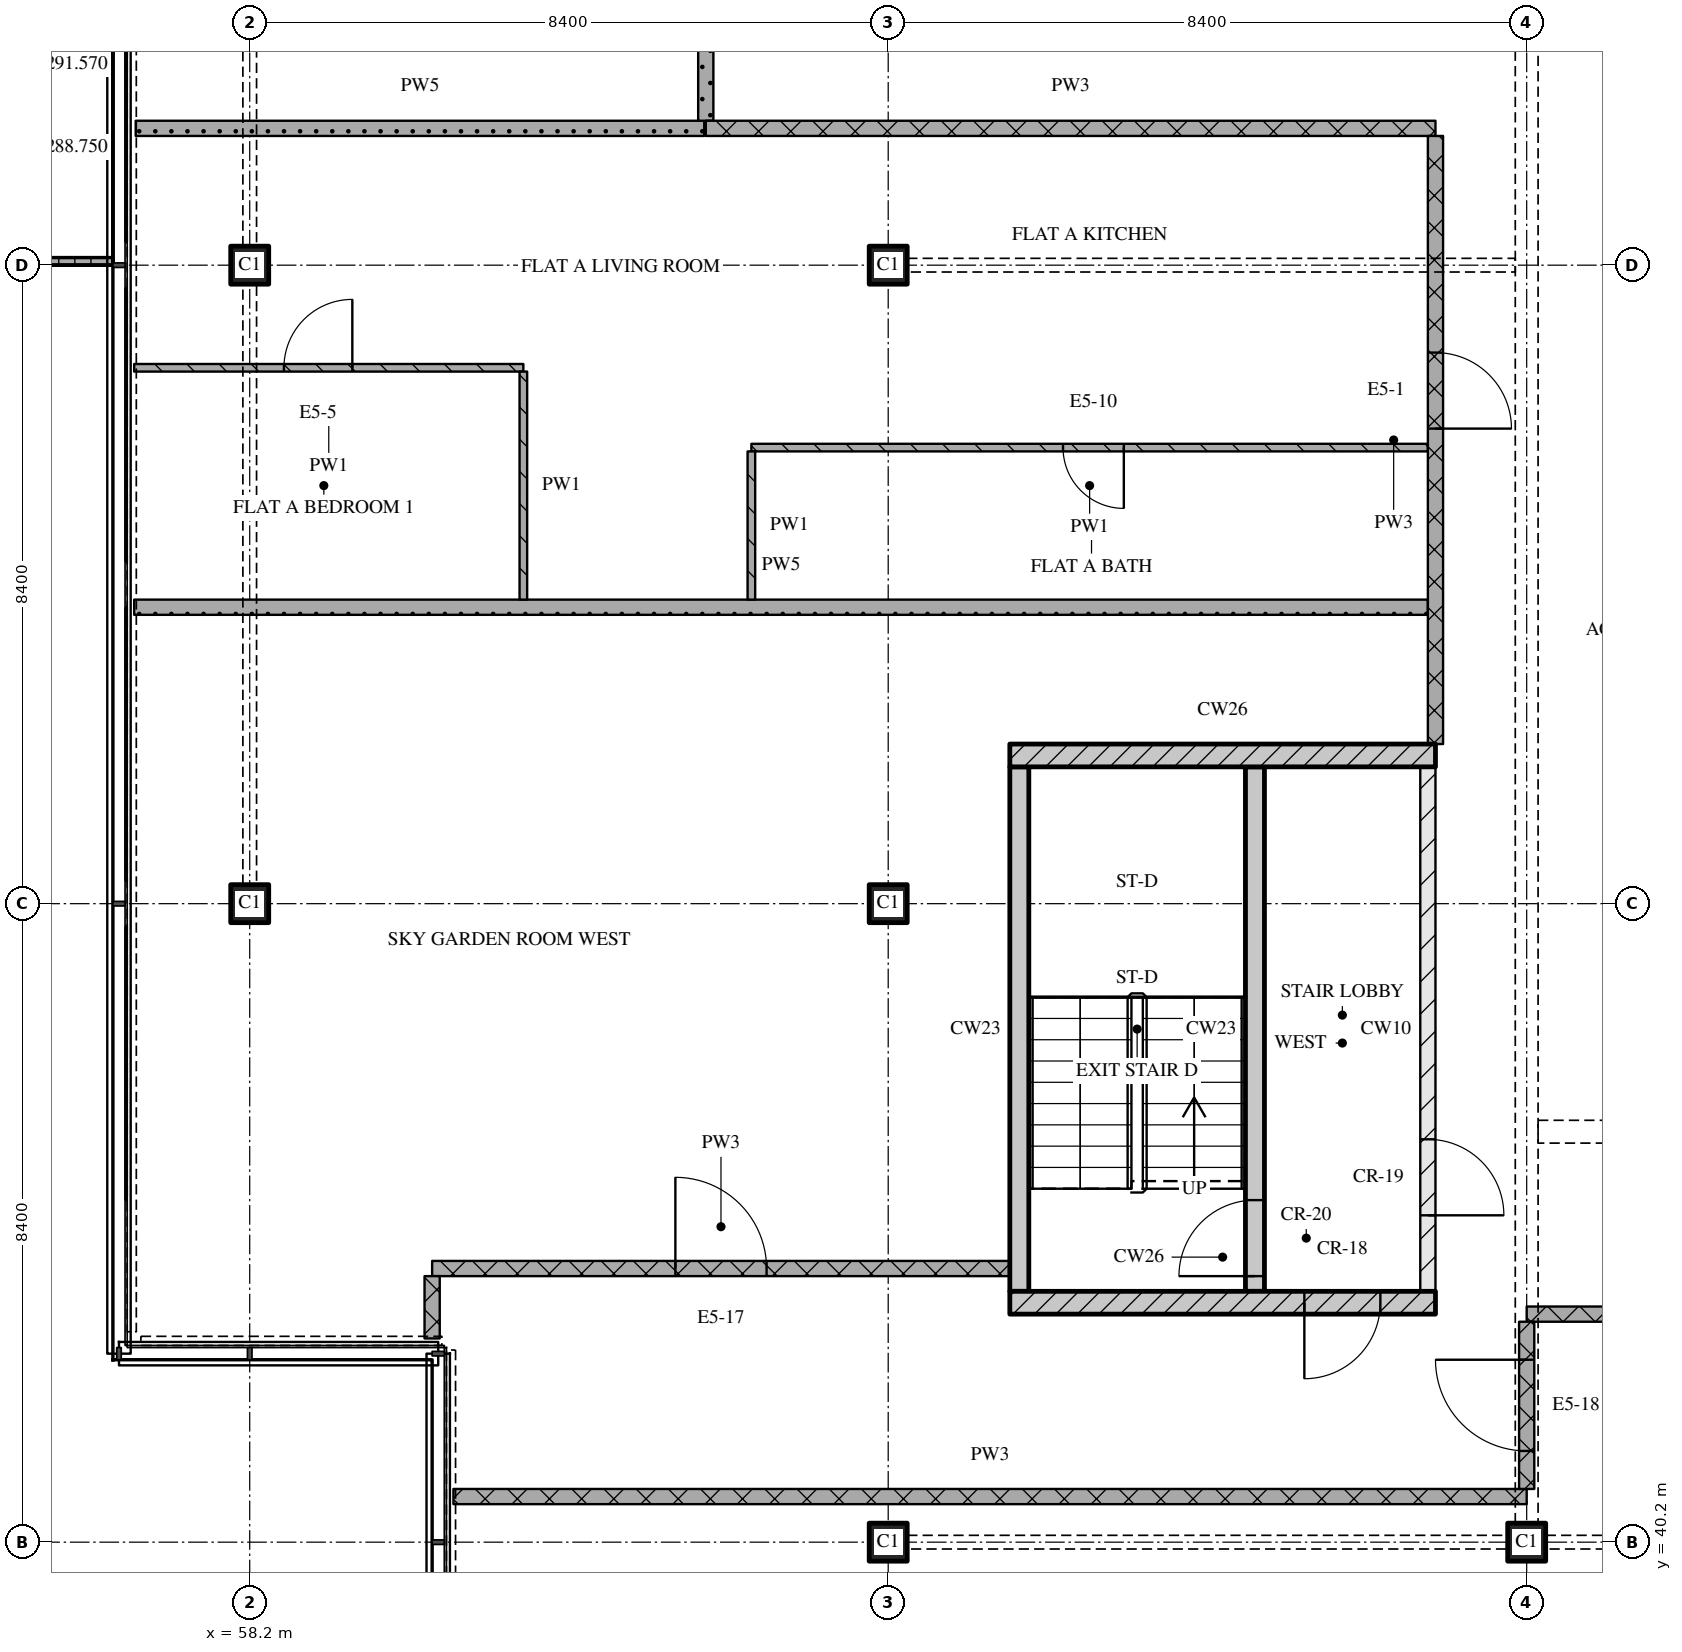
"""IFC4 building model, lengths in metres.
Left out: names, types, materials, properties, quantities, classifications, styles, units other than length and angle.
Written with IfcOpenShell. Run it as: python <this file> out.ifc"""

import sys

from ifc_helpers import new_model, si_unit, direction, frame, frame_2d, origin, origin_2d, place, context, subcontext, project, spatial, polyline, rectangle, outline, extrude, element, fill, save


model = new_model("IFC4")
c1 = context("Model", 3, precision=1e-05, world=origin(), true_north=direction((0.0, 1.0)))
c2 = subcontext(c1, "Body", "Model", "MODEL_VIEW")
j1 = project(units=[si_unit("LENGTHUNIT", "METRE"), si_unit("PLANEANGLEUNIT", "RADIAN")], contexts=[c1])
p1 = place(None, origin())
s1 = spatial("IfcSite", under=j1, at=p1, CompositionType="ELEMENT")
p2 = place(p1, origin())
s2 = spatial("IfcBuilding", under=s1, at=p2, CompositionType="ELEMENT")
p3 = place(p2, frame((0.0, 0.0, 288.75)))
s3 = spatial("IfcBuildingStorey", under=s2, at=p3, CompositionType="ELEMENT", Elevation=288.75)
for number, where, z_axis, x_axis in (
    (1, (58.2, 48.6, 0.0), (0.0, 0.0, 1.0), (1.0, 0.0, 0.0)),
    (2, (58.2, 57.0, 0.0), (0.0, 0.0, 1.0), (1.0, 0.0, 0.0)),
    (3, (66.6, 40.2, 0.0), (0.0, 0.0, 1.0), (1.0, 0.0, 0.0)),
    (4, (66.6, 48.6, 0.0), (0.0, 0.0, 1.0), (1.0, 0.0, 0.0)),
    (5, (66.6, 57.0, 0.0), (0.0, 0.0, 1.0), (1.0, 0.0, 0.0)),
    (6, (75.0, 40.2, 0.0), (0.0, 0.0, 1.0), (1.0, 0.0, 0.0)),
):
    element("IfcColumn", number, at=place(p3, frame(where, z_axis=z_axis, x_axis=x_axis)), inside=s3, PredefinedType="COLUMN", context=c2, shape_type="SweptSolid", body=[
        extrude(rectangle(XDim=0.5, YDim=0.5, at=origin_2d()), origin(), (0.0, 0.0, 1.0), 3.6),
    ])
p4 = place(p3, origin())
e7 = element("IfcWall", 7, at=p4, inside=s3, PredefinedType="SOLIDWALL", context=c2, shape_type="SweptSolid", body=[
    extrude(outline(polyline([(56.4, 61.2), (56.4, 61.1), (54.767, 61.1), (54.767, 57.1), (56.4, 57.1), (56.4, 57.0), (54.667, 57.0), (54.667, 61.2), (56.4, 61.2)])), origin(), (0.0, 0.0, 1.0), 1.0),
])
p5 = place(p3, frame((68.2, 43.35, 0.0), z_axis=(0.0, 0.0, 1.0), x_axis=(1.0, 0.0, 0.0)))
e8 = element("IfcWall", 8, at=p5, inside=s3, PredefinedType="SOLIDWALL", context=c2, shape_type="SweptSolid", body=[
    extrude(rectangle(XDim=5.6, YDim=0.3, at=frame_2d((2.8, 0.0))), origin(), (0.0, 0.0, 1.0), 3.32),
])
p6 = place(p5, frame((3.875, 0.0, 0.0)))
e9 = element("IfcOpeningElement", 9, at=p6, cuts=e8, PredefinedType="OPENING", context=c2, shape_type="SweptSolid", body=[
    extrude(rectangle(XDim=1.0, YDim=2.1, at=frame_2d((0.5, 1.05))), frame((0.0, 0.16, 0.0), z_axis=(0.0, -1.0, 0.0), x_axis=(1.0, 0.0, 0.0)), (0.0, 0.0, 1.0), 0.32),
])
p7 = place(p3, frame((68.325, 43.5, 0.0), z_axis=(0.0, 0.0, 1.0), x_axis=(0.0, 1.0, 0.0)))
e10 = element("IfcWall", 10, at=p7, inside=s3, PredefinedType="SOLIDWALL", context=c2, shape_type="SweptSolid", body=[
    extrude(rectangle(XDim=6.9, YDim=0.25, at=frame_2d((3.45, 0.0))), origin(), (0.0, 0.0, 1.0), 3.32),
])
p8 = place(p3, frame((71.425, 43.5, 0.0), z_axis=(0.0, 0.0, 1.0), x_axis=(0.0, 1.0, 0.0)))
e11 = element("IfcWall", 11, at=p8, inside=s3, PredefinedType="SOLIDWALL", context=c2, shape_type="SweptSolid", body=[
    extrude(rectangle(XDim=6.9, YDim=0.25, at=frame_2d((3.45, 0.0))), origin(), (0.0, 0.0, 1.0), 3.32),
])
p9 = place(p8, frame((0.2, 0.0, 0.0)))
e12 = element("IfcOpeningElement", 12, at=p9, cuts=e11, PredefinedType="OPENING", context=c2, shape_type="SweptSolid", body=[
    extrude(rectangle(XDim=1.0, YDim=2.1, at=frame_2d((0.5, 1.05))), frame((0.0, 0.135, 0.0), z_axis=(0.0, -1.0, 0.0), x_axis=(1.0, 0.0, 0.0)), (0.0, 0.0, 1.0), 0.27),
])
p10 = place(p3, frame((73.7, 43.5, 0.0), z_axis=(0.0, 0.0, 1.0), x_axis=(0.0, 1.0, 0.0)))
e13 = element("IfcWall", 13, at=p10, inside=s3, PredefinedType="PARTITIONING", context=c2, shape_type="SweptSolid", body=[
    extrude(rectangle(XDim=6.9, YDim=0.2, at=frame_2d((3.45, 0.0))), origin(), (0.0, 0.0, 1.0), 3.32),
])
p11 = place(p10, frame((1.0, 0.0, 0.0)))
e14 = element("IfcOpeningElement", 14, at=p11, cuts=e13, PredefinedType="OPENING", context=c2, shape_type="SweptSolid", body=[
    extrude(rectangle(XDim=1.0, YDim=2.1, at=frame_2d((0.5, 1.05))), frame((0.0, 0.11, 0.0), z_axis=(0.0, -1.0, 0.0), x_axis=(1.0, 0.0, 0.0)), (0.0, 0.0, 1.0), 0.22),
])
p12 = place(p3, frame((68.2, 50.55, 0.0), z_axis=(0.0, 0.0, 1.0), x_axis=(1.0, 0.0, 0.0)))
e15 = element("IfcWall", 15, at=p12, inside=s3, PredefinedType="SOLIDWALL", context=c2, shape_type="SweptSolid", body=[
    extrude(rectangle(XDim=5.6, YDim=0.3, at=frame_2d((2.8, 0.0))), origin(), (0.0, 0.0, 1.0), 3.32),
])
p13 = place(p3, frame((60.88, 40.8, 0.0), z_axis=(0.0, 0.0, 1.0), x_axis=(1.0, 0.0, 0.0)))
e16 = element("IfcWall", 16, at=p13, inside=s3, PredefinedType="PARTITIONING", context=c2, shape_type="SweptSolid", body=[
    extrude(rectangle(XDim=14.12, YDim=0.2, at=frame_2d((7.06, 0.0))), origin(), (0.0, 0.0, 1.0), 3.32),
])
p14 = place(p3, frame((100.2, 43.2, 0.0), z_axis=(0.0, 0.0, 1.0), x_axis=(-1.0, 0.0, 0.0)))
e17 = element("IfcWall", 17, at=p14, inside=s3, PredefinedType="PARTITIONING", context=c2, shape_type="SweptSolid", body=[
    extrude(rectangle(XDim=25.2, YDim=0.2, at=frame_2d((12.6, 0.0))), origin(), (0.0, 0.0, 1.0), 3.32),
])
p15 = place(p14, frame((12.0, 0.0, 0.0)))
e18 = element("IfcOpeningElement", 18, at=p15, cuts=e17, PredefinedType="OPENING", context=c2, shape_type="SweptSolid", body=[
    extrude(rectangle(XDim=1.2, YDim=2.1, at=frame_2d((0.6, 1.05))), frame((0.0, 0.11, 0.0), z_axis=(0.0, -1.0, 0.0), x_axis=(1.0, 0.0, 0.0)), (0.0, 0.0, 1.0), 0.22),
])
p16 = place(p3, frame((60.6, 43.8, 0.0), z_axis=(0.0, 0.0, 1.0), x_axis=(1.0, 0.0, 0.0)))
e19 = element("IfcWall", 19, at=p16, inside=s3, PredefinedType="PARTITIONING", context=c2, shape_type="SweptSolid", body=[
    extrude(rectangle(XDim=7.6, YDim=0.2, at=frame_2d((3.8, 0.0))), origin(), (0.0, 0.0, 1.0), 3.32),
])
p17 = place(p16, frame((3.2, 0.0, 0.0)))
e20 = element("IfcOpeningElement", 20, at=p17, cuts=e19, PredefinedType="OPENING", context=c2, shape_type="SweptSolid", body=[
    extrude(rectangle(XDim=1.2, YDim=2.1, at=frame_2d((0.6, 1.05))), frame((0.0, 0.11, 0.0), z_axis=(0.0, -1.0, 0.0), x_axis=(1.0, 0.0, 0.0)), (0.0, 0.0, 1.0), 0.22),
])
p18 = place(p3, frame((56.68, 52.5, 0.0), z_axis=(0.0, 0.0, 1.0), x_axis=(1.0, 0.0, 0.0)))
e21 = element("IfcWall", 21, at=p18, inside=s3, PredefinedType="PARTITIONING", context=c2, shape_type="SweptSolid", body=[
    extrude(rectangle(XDim=17.02, YDim=0.2, at=frame_2d((8.51, 0.0))), origin(), (0.0, 0.0, 1.0), 3.32),
])
p19 = place(p3, frame((73.7, 54.6, 0.0), z_axis=(0.0, 0.0, 1.0), x_axis=(-1.0, 0.0, 0.0)))
e22 = element("IfcWall", 22, at=p19, inside=s3, PredefinedType="PARTITIONING", context=c2, shape_type="SweptSolid", body=[
    extrude(rectangle(XDim=8.9, YDim=0.1, at=frame_2d((4.45, 0.0))), origin(), (0.0, 0.0, 1.0), 3.32),
])
p20 = place(p19, frame((4.0, 0.0, 0.0)))
e23 = element("IfcOpeningElement", 23, at=p20, cuts=e22, PredefinedType="OPENING", context=c2, shape_type="SweptSolid", body=[
    extrude(rectangle(XDim=0.8, YDim=2.1, at=frame_2d((0.4, 1.05))), frame((0.0, 0.06, 0.0), z_axis=(0.0, -1.0, 0.0), x_axis=(1.0, 0.0, 0.0)), (0.0, 0.0, 1.0), 0.12),
])
p21 = place(p3, frame((61.8, 55.65, 0.0), z_axis=(0.0, 0.0, 1.0), x_axis=(-1.0, 0.0, 0.0)))
e24 = element("IfcWall", 24, at=p21, inside=s3, PredefinedType="PARTITIONING", context=c2, shape_type="SweptSolid", body=[
    extrude(rectangle(XDim=5.12, YDim=0.1, at=frame_2d((2.56, 0.0))), origin(), (0.0, 0.0, 1.0), 3.32),
])
p22 = place(p21, frame((2.25, 0.0, 0.0)))
e25 = element("IfcOpeningElement", 25, at=p22, cuts=e24, PredefinedType="OPENING", context=c2, shape_type="SweptSolid", body=[
    extrude(rectangle(XDim=0.9, YDim=2.1, at=frame_2d((0.45, 1.05))), frame((0.0, 0.06, 0.0), z_axis=(0.0, -1.0, 0.0), x_axis=(1.0, 0.0, 0.0)), (0.0, 0.0, 1.0), 0.12),
])
p23 = place(p3, frame((64.2, 58.8, 0.0), z_axis=(0.0, 0.0, 1.0), x_axis=(1.0, 0.0, 0.0)))
e26 = element("IfcWall", 26, at=p23, inside=s3, PredefinedType="PARTITIONING", context=c2, shape_type="SweptSolid", body=[
    extrude(rectangle(XDim=9.6, YDim=0.2, at=frame_2d((4.8, 0.0))), origin(), (0.0, 0.0, 1.0), 3.32),
])
p24 = place(p3, frame((56.7, 58.8, 0.0), z_axis=(0.0, 0.0, 1.0), x_axis=(1.0, 0.0, 0.0)))
e27 = element("IfcWall", 27, at=p24, inside=s3, PredefinedType="PARTITIONING", context=c2, shape_type="SweptSolid", body=[
    extrude(rectangle(XDim=7.48, YDim=0.2, at=frame_2d((3.74, 0.0))), origin(), (0.0, 0.0, 1.0), 3.32),
])
p25 = place(p3, frame((60.6, 43.7, 0.0), z_axis=(0.0, 0.0, 1.0), x_axis=(0.0, -1.0, 0.0)))
e28 = element("IfcWall", 28, at=p25, inside=s3, PredefinedType="PARTITIONING", context=c2, shape_type="SweptSolid", body=[
    extrude(rectangle(XDim=0.82, YDim=0.2, at=frame_2d((0.41, 0.0))), origin(), (0.0, 0.0, 1.0), 3.32),
])
p26 = place(p3, frame((61.8, 55.6, 0.0), z_axis=(0.0, 0.0, 1.0), x_axis=(0.0, -1.0, 0.0)))
e29 = element("IfcWall", 29, at=p26, inside=s3, PredefinedType="PARTITIONING", context=c2, shape_type="SweptSolid", body=[
    extrude(rectangle(XDim=3.0, YDim=0.1, at=frame_2d((1.5, 0.0))), origin(), (0.0, 0.0, 1.0), 3.32),
])
p27 = place(p3, frame((64.2, 61.1, 0.0), z_axis=(0.0, 0.0, 1.0), x_axis=(0.0, -1.0, 0.0)))
e30 = element("IfcWall", 30, at=p27, inside=s3, PredefinedType="PARTITIONING", context=c2, shape_type="SweptSolid", body=[
    extrude(rectangle(XDim=2.2, YDim=0.2, at=frame_2d((1.1, 0.0))), origin(), (0.0, 0.0, 1.0), 3.32),
])
p28 = place(p3, frame((64.8, 54.55, 0.0), z_axis=(0.0, 0.0, 1.0), x_axis=(0.0, -1.0, 0.0)))
e31 = element("IfcWall", 31, at=p28, inside=s3, PredefinedType="PARTITIONING", context=c2, shape_type="SweptSolid", body=[
    extrude(rectangle(XDim=1.95, YDim=0.1, at=frame_2d((0.975, 0.0))), origin(), (0.0, 0.0, 1.0), 3.32),
])
p29 = place(p3, frame((73.8, 50.7, 0.0), z_axis=(0.0, 0.0, 1.0), x_axis=(0.0, 1.0, 0.0)))
e32 = element("IfcWall", 32, at=p29, inside=s3, PredefinedType="PARTITIONING", context=c2, shape_type="SweptSolid", body=[
    extrude(rectangle(XDim=8.0, YDim=0.2, at=frame_2d((4.0, 0.0))), origin(), (0.0, 0.0, 1.0), 3.32),
])
p30 = place(p29, frame((4.15, 0.0, 0.0)))
e33 = element("IfcOpeningElement", 33, at=p30, cuts=e32, PredefinedType="OPENING", context=c2, shape_type="SweptSolid", body=[
    extrude(rectangle(XDim=1.0, YDim=2.1, at=frame_2d((0.5, 1.05))), frame((0.0, 0.11, 0.0), z_axis=(0.0, -1.0, 0.0), x_axis=(1.0, 0.0, 0.0)), (0.0, 0.0, 1.0), 0.22),
])
p31 = place(p3, frame((75.0, 43.1, 0.0), z_axis=(0.0, 0.0, 1.0), x_axis=(0.0, -1.0, 0.0)))
e34 = element("IfcWall", 34, at=p31, inside=s3, PredefinedType="PARTITIONING", context=c2, shape_type="SweptSolid", body=[
    extrude(rectangle(XDim=2.2, YDim=0.2, at=frame_2d((1.1, 0.0))), origin(), (0.0, 0.0, 1.0), 2.53),
])
p32 = place(p31, frame((0.5, 0.0, 0.0)))
e35 = element("IfcOpeningElement", 35, at=p32, cuts=e34, PredefinedType="OPENING", context=c2, shape_type="SweptSolid", body=[
    extrude(rectangle(XDim=1.2, YDim=2.1, at=frame_2d((0.6, 1.05))), frame((0.0, 0.11, 0.0), z_axis=(0.0, -1.0, 0.0), x_axis=(1.0, 0.0, 0.0)), (0.0, 0.0, 1.0), 0.22),
])
p33 = place(p6, origin())
e36 = element("IfcDoor", 36, at=p33, inside=s3, OperationType="SINGLE_SWING_RIGHT", PredefinedType="DOOR", context=c2, shape_type="SweptSolid", body=[
    extrude(rectangle(XDim=1.0, YDim=2.1, at=frame_2d((0.5, 1.05))), frame((0.0, 0.025, 0.0), z_axis=(0.0, -1.0, 0.0), x_axis=(1.0, 0.0, 0.0)), (0.0, 0.0, 1.0), 0.05),
])
fill(e9, e36)
p34 = place(p9, origin())
e37 = element("IfcDoor", 37, at=p34, inside=s3, OperationType="SINGLE_SWING_LEFT", PredefinedType="DOOR", context=c2, shape_type="SweptSolid", body=[
    extrude(rectangle(XDim=1.0, YDim=2.1, at=frame_2d((0.5, 1.05))), frame((0.0, 0.025, 0.0), z_axis=(0.0, -1.0, 0.0), x_axis=(1.0, 0.0, 0.0)), (0.0, 0.0, 1.0), 0.05),
])
fill(e12, e37)
p35 = place(p11, origin())
e38 = element("IfcDoor", 38, at=p35, inside=s3, OperationType="SINGLE_SWING_RIGHT", PredefinedType="DOOR", context=c2, shape_type="SweptSolid", body=[
    extrude(rectangle(XDim=1.0, YDim=2.1, at=frame_2d((0.5, 1.05))), frame((0.0, 0.025, 0.0), z_axis=(0.0, -1.0, 0.0), x_axis=(1.0, 0.0, 0.0)), (0.0, 0.0, 1.0), 0.05),
])
fill(e14, e38)
p36 = place(p17, origin())
e39 = element("IfcDoor", 39, at=p36, inside=s3, OperationType="SINGLE_SWING_LEFT", PredefinedType="DOOR", context=c2, shape_type="SweptSolid", body=[
    extrude(rectangle(XDim=1.2, YDim=2.1, at=frame_2d((0.6, 1.05))), frame((0.0, 0.025, 0.0), z_axis=(0.0, -1.0, 0.0), x_axis=(1.0, 0.0, 0.0)), (0.0, 0.0, 1.0), 0.05),
])
fill(e20, e39)
p37 = place(p20, origin())
e40 = element("IfcDoor", 40, at=p37, inside=s3, OperationType="SINGLE_SWING_LEFT", PredefinedType="DOOR", context=c2, shape_type="SweptSolid", body=[
    extrude(rectangle(XDim=0.8, YDim=2.1, at=frame_2d((0.4, 1.05))), frame((0.0, 0.025, 0.0), z_axis=(0.0, -1.0, 0.0), x_axis=(1.0, 0.0, 0.0)), (0.0, 0.0, 1.0), 0.05),
])
fill(e23, e40)
p38 = place(p22, origin())
e41 = element("IfcDoor", 41, at=p38, inside=s3, OperationType="SINGLE_SWING_RIGHT", PredefinedType="DOOR", context=c2, shape_type="SweptSolid", body=[
    extrude(rectangle(XDim=0.9, YDim=2.1, at=frame_2d((0.45, 1.05))), frame((0.0, 0.025, 0.0), z_axis=(0.0, -1.0, 0.0), x_axis=(1.0, 0.0, 0.0)), (0.0, 0.0, 1.0), 0.05),
])
fill(e25, e41)
p39 = place(p30, origin())
e42 = element("IfcDoor", 42, at=p39, inside=s3, OperationType="SINGLE_SWING_RIGHT", PredefinedType="DOOR", context=c2, shape_type="SweptSolid", body=[
    extrude(rectangle(XDim=1.0, YDim=2.1, at=frame_2d((0.5, 1.05))), frame((0.0, 0.025, 0.0), z_axis=(0.0, -1.0, 0.0), x_axis=(1.0, 0.0, 0.0)), (0.0, 0.0, 1.0), 0.05),
])
fill(e33, e42)
p40 = place(p32, origin())
e43 = element("IfcDoor", 43, at=p40, inside=s3, OperationType="SINGLE_SWING_RIGHT", PredefinedType="DOOR", context=c2, shape_type="SweptSolid", body=[
    extrude(rectangle(XDim=1.2, YDim=2.1, at=frame_2d((0.6, 1.05))), frame((0.0, 0.025, 0.0), z_axis=(0.0, -1.0, 0.0), x_axis=(1.0, 0.0, 0.0)), (0.0, 0.0, 1.0), 0.05),
])
fill(e35, e43)
save(model, sys.argv[1])
